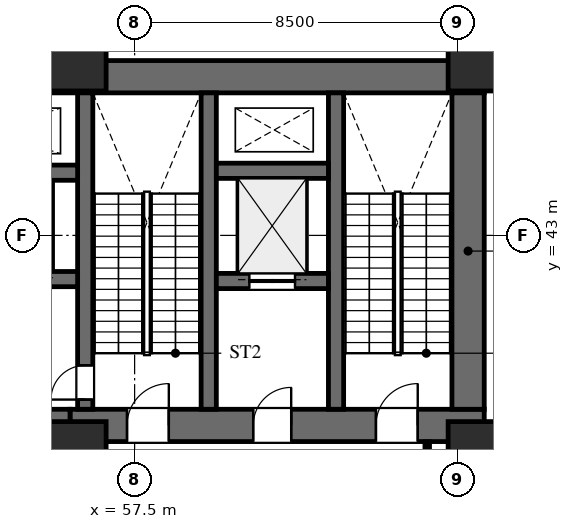
"""IFC4 building model, lengths in metres.
Left out: names, types, materials, properties, quantities, classifications, styles, units other than length and angle.
Written with IfcOpenShell. Run it as: python <this file> out.ifc"""

import sys

from ifc_helpers import new_model, si_unit, direction, frame, frame_2d, origin, origin_2d, place, context, subcontext, project, spatial, rectangle, extrude, element, fill, save


model = new_model("IFC4")
c1 = context("Model", 3, precision=1e-05, world=origin(), true_north=direction((0.0, 1.0)))
c2 = subcontext(c1, "Body", "Model", "MODEL_VIEW")
j1 = project(units=[si_unit("LENGTHUNIT", "METRE"), si_unit("PLANEANGLEUNIT", "RADIAN")], contexts=[c1])
p1 = place(None, origin())
s1 = spatial("IfcSite", under=j1, at=p1, CompositionType="ELEMENT")
p2 = place(p1, origin())
s2 = spatial("IfcBuilding", under=s1, at=p2, CompositionType="ELEMENT")
p3 = place(p2, frame((0.0, 0.0, 5.4)))
s3 = spatial("IfcBuildingStorey", under=s2, at=p3, CompositionType="ELEMENT", Elevation=5.4)
p4 = place(p3, frame((22.9, 47.175, 0.0), z_axis=(0.0, 0.0, 1.0), x_axis=(1.0, 0.0, 0.0)))
e1 = element("IfcWall", 1, at=p4, inside=s3, PredefinedType="SHEAR", context=c2, shape_type="SweptSolid", body=[
    extrude(rectangle(XDim=43.8, YDim=0.85, at=frame_2d((21.9, 0.0))), origin(), (0.0, 0.0, 1.0), 5.4),
])
p5 = place(p3, frame((55.8, 38.0, 0.0), z_axis=(0.0, 0.0, 1.0), x_axis=(1.0, 0.0, 0.0)))
e2 = element("IfcWall", 2, at=p5, inside=s3, PredefinedType="SHEAR", context=c2, shape_type="SweptSolid", body=[
    extrude(rectangle(XDim=10.9, YDim=0.85, at=frame_2d((5.45, 0.0))), origin(), (0.0, 0.0, 1.0), 5.4),
])
p6 = place(p5, frame((1.5, 0.0, 0.0)))
e3 = element("IfcOpeningElement", 3, at=p6, cuts=e2, PredefinedType="OPENING", context=c2, shape_type="SweptSolid", body=[
    extrude(rectangle(XDim=1.1, YDim=2.2, at=frame_2d((0.55, 1.1))), frame((0.0, 0.435, 0.0), z_axis=(0.0, -1.0, 0.0), x_axis=(1.0, 0.0, 0.0)), (0.0, 0.0, 1.0), 0.87),
])
p7 = place(p5, frame((4.82, 0.0, 0.0)))
e4 = element("IfcOpeningElement", 4, at=p7, cuts=e2, PredefinedType="OPENING", context=c2, shape_type="SweptSolid", body=[
    extrude(rectangle(XDim=1.0, YDim=2.15, at=frame_2d((0.5, 1.075))), frame((0.0, 0.435, 0.0), z_axis=(0.0, -1.0, 0.0), x_axis=(1.0, 0.0, 0.0)), (0.0, 0.0, 1.0), 0.87),
])
p8 = place(p5, frame((8.05, 0.0, 0.0)))
e5 = element("IfcOpeningElement", 5, at=p8, cuts=e2, PredefinedType="OPENING", context=c2, shape_type="SweptSolid", body=[
    extrude(rectangle(XDim=1.1, YDim=2.2, at=frame_2d((0.55, 1.1))), frame((0.0, 0.435, 0.0), z_axis=(0.0, -1.0, 0.0), x_axis=(1.0, 0.0, 0.0)), (0.0, 0.0, 1.0), 0.87),
])
p9 = place(p3, frame((66.275, 38.425, 0.0), z_axis=(0.0, 0.0, 1.0), x_axis=(0.0, 1.0, 0.0)))
e6 = element("IfcWall", 6, at=p9, inside=s3, PredefinedType="SHEAR", context=c2, shape_type="SweptSolid", body=[
    extrude(rectangle(XDim=8.325, YDim=0.85, at=frame_2d((4.163, 0.0))), origin(), (0.0, 0.0, 1.0), 5.4),
])
for number, where, z_axis, x_axis in (
    (7, (62.8, 38.425, 0.0), (0.0, 0.0, 1.0), (0.0, 1.0, 0.0)),
    (8, (59.45, 38.425, 0.0), (0.0, 0.0, 1.0), (0.0, 1.0, 0.0)),
):
    element("IfcWall", number, at=place(p3, frame(where, z_axis=z_axis, x_axis=x_axis)), inside=s3, PredefinedType="SHEAR", context=c2, shape_type="SweptSolid", body=[
        extrude(rectangle(XDim=8.325, YDim=0.4, at=frame_2d((4.163, 0.0))), origin(), (0.0, 0.0, 1.0), 5.4),
    ])
p10 = place(p3, frame((56.2, 38.425, 0.0), z_axis=(0.0, 0.0, 1.0), x_axis=(0.0, 1.0, 0.0)))
e9 = element("IfcWall", 9, at=p10, inside=s3, PredefinedType="SHEAR", context=c2, shape_type="SweptSolid", body=[
    extrude(rectangle(XDim=8.325, YDim=0.4, at=frame_2d((4.163, 0.0))), origin(), (0.0, 0.0, 1.0), 5.4),
])
p11 = place(p10, frame((0.255, 0.0, 0.0)))
e10 = element("IfcOpeningElement", 10, at=p11, cuts=e9, PredefinedType="OPENING", context=c2, shape_type="SweptSolid", body=[
    extrude(rectangle(XDim=0.9, YDim=2.15, at=frame_2d((0.45, 1.075))), frame((0.0, 0.21, 0.0), z_axis=(0.0, -1.0, 0.0), x_axis=(1.0, 0.0, 0.0)), (0.0, 0.0, 1.0), 0.42),
])
p12 = place(p3, frame((59.65, 41.8, 0.0), z_axis=(0.0, 0.0, 1.0), x_axis=(1.0, 0.0, 0.0)))
e11 = element("IfcWall", 11, at=p12, inside=s3, PredefinedType="SHEAR", context=c2, shape_type="SweptSolid", body=[
    extrude(rectangle(XDim=2.95, YDim=0.4, at=frame_2d((1.475, 0.0))), origin(), (0.0, 0.0, 1.0), 5.4),
])
p13 = place(p12, frame((0.87, 0.0, 0.0)))
e12 = element("IfcOpeningElement", 12, at=p13, cuts=e11, PredefinedType="OPENING", context=c2, shape_type="SweptSolid", body=[
    extrude(rectangle(XDim=1.2, YDim=2.2, at=frame_2d((0.6, 1.1))), frame((0.0, 0.21, 0.0), z_axis=(0.0, -1.0, 0.0), x_axis=(1.0, 0.0, 0.0)), (0.0, 0.0, 1.0), 0.42),
])
p14 = place(p3, frame((59.65, 44.7, 0.0), z_axis=(0.0, 0.0, 1.0), x_axis=(1.0, 0.0, 0.0)))
e13 = element("IfcWall", 13, at=p14, inside=s3, PredefinedType="SHEAR", context=c2, shape_type="SweptSolid", body=[
    extrude(rectangle(XDim=2.95, YDim=0.4, at=frame_2d((1.475, 0.0))), origin(), (0.0, 0.0, 1.0), 5.4),
])
p15 = place(p3, frame((50.8, 38.0, 0.0), z_axis=(0.0, 0.0, 1.0), x_axis=(1.0, 0.0, 0.0)))
e14 = element("IfcWall", 14, at=p15, inside=s3, PredefinedType="SHEAR", context=c2, shape_type="SweptSolid", body=[
    extrude(rectangle(XDim=5.0, YDim=0.85, at=frame_2d((2.5, 0.0))), origin(), (0.0, 0.0, 1.0), 5.4),
])
p16 = place(p15, frame((2.0, 0.0, 0.0)))
e15 = element("IfcOpeningElement", 15, at=p16, cuts=e14, PredefinedType="OPENING", context=c2, shape_type="SweptSolid", body=[
    extrude(rectangle(XDim=1.2, YDim=2.2, at=frame_2d((0.6, 1.1))), frame((0.0, 0.435, 0.0), z_axis=(0.0, -1.0, 0.0), x_axis=(1.0, 0.0, 0.0)), (0.0, 0.0, 1.0), 0.87),
])
p17 = place(p3, frame((51.25, 41.85, 0.0), z_axis=(0.0, 0.0, 1.0), x_axis=(1.0, 0.0, 0.0)))
e16 = element("IfcWall", 16, at=p17, inside=s3, PredefinedType="SHEAR", context=c2, shape_type="SweptSolid", body=[
    extrude(rectangle(XDim=4.75, YDim=0.4, at=frame_2d((2.375, 0.0))), origin(), (0.0, 0.0, 1.0), 5.4),
])
p18 = place(p17, frame((0.5, 0.0, 0.0)))
e17 = element("IfcOpeningElement", 17, at=p18, cuts=e16, PredefinedType="OPENING", context=c2, shape_type="SweptSolid", body=[
    extrude(rectangle(XDim=1.2, YDim=2.2, at=frame_2d((0.6, 1.1))), frame((0.0, 0.21, 0.0), z_axis=(0.0, -1.0, 0.0), x_axis=(1.0, 0.0, 0.0)), (0.0, 0.0, 1.0), 0.42),
])
p19 = place(p17, frame((2.6, 0.0, 0.0)))
e18 = element("IfcOpeningElement", 18, at=p19, cuts=e16, PredefinedType="OPENING", context=c2, shape_type="SweptSolid", body=[
    extrude(rectangle(XDim=1.2, YDim=2.2, at=frame_2d((0.6, 1.1))), frame((0.0, 0.21, 0.0), z_axis=(0.0, -1.0, 0.0), x_axis=(1.0, 0.0, 0.0)), (0.0, 0.0, 1.0), 0.42),
])
p20 = place(p3, frame((51.25, 44.65, 0.0), z_axis=(0.0, 0.0, 1.0), x_axis=(1.0, 0.0, 0.0)))
e19 = element("IfcWall", 19, at=p20, inside=s3, PredefinedType="SHEAR", context=c2, shape_type="SweptSolid", body=[
    extrude(rectangle(XDim=4.75, YDim=0.4, at=frame_2d((2.375, 0.0))), origin(), (0.0, 0.0, 1.0), 5.4),
])
for number, where, z_axis, x_axis in (
    (20, (66.5, 47.55, 0.0), (0.0, 0.0, 1.0), (1.0, 0.0, 0.0)),
    (21, (56.0, 47.55, 0.0), (0.0, 0.0, 1.0), (1.0, 0.0, 0.0)),
    (22, (66.5, 37.35, 0.0), (0.0, 0.0, 1.0), (1.0, 0.0, 0.0)),
    (23, (56.0, 37.35, 0.0), (0.0, 0.0, 1.0), (1.0, 0.0, 0.0)),
):
    element("IfcColumn", number, at=place(p3, frame(where, z_axis=z_axis, x_axis=x_axis)), inside=s3, PredefinedType="COLUMN", context=c2, shape_type="SweptSolid", body=[
        extrude(rectangle(XDim=1.5, YDim=1.5, at=origin_2d()), origin(), (0.0, 0.0, 1.0), 5.4),
    ])
p21 = place(p3, frame((65.2, 34.4, 0.0), z_axis=(0.0, 0.0, 1.0), x_axis=(0.0, 1.0, 0.0)))
e24 = element("IfcWall", 24, at=p21, inside=s3, PredefinedType="PARTITIONING", context=c2, shape_type="SweptSolid", body=[
    extrude(rectangle(XDim=3.167, YDim=0.12, at=frame_2d((1.583, 0.0))), origin(), (0.0, 0.0, 1.0), 4.182),
])
p22 = place(p6, origin())
e25 = element("IfcDoor", 25, at=p22, inside=s3, OperationType="SINGLE_SWING_RIGHT", PredefinedType="DOOR", context=c2, shape_type="SweptSolid", body=[
    extrude(rectangle(XDim=1.1, YDim=2.2, at=frame_2d((0.55, 1.1))), frame((0.0, 0.025, 0.0), z_axis=(0.0, -1.0, 0.0), x_axis=(1.0, 0.0, 0.0)), (0.0, 0.0, 1.0), 0.05),
])
fill(e3, e25)
p23 = place(p7, origin())
e26 = element("IfcDoor", 26, at=p23, inside=s3, OperationType="SINGLE_SWING_RIGHT", PredefinedType="DOOR", context=c2, shape_type="SweptSolid", body=[
    extrude(rectangle(XDim=1.0, YDim=2.15, at=frame_2d((0.5, 1.075))), frame((0.0, 0.025, 0.0), z_axis=(0.0, -1.0, 0.0), x_axis=(1.0, 0.0, 0.0)), (0.0, 0.0, 1.0), 0.05),
])
fill(e4, e26)
p24 = place(p8, origin())
e27 = element("IfcDoor", 27, at=p24, inside=s3, OperationType="SINGLE_SWING_RIGHT", PredefinedType="DOOR", context=c2, shape_type="SweptSolid", body=[
    extrude(rectangle(XDim=1.1, YDim=2.2, at=frame_2d((0.55, 1.1))), frame((0.0, 0.025, 0.0), z_axis=(0.0, -1.0, 0.0), x_axis=(1.0, 0.0, 0.0)), (0.0, 0.0, 1.0), 0.05),
])
fill(e5, e27)
p25 = place(p11, origin())
e28 = element("IfcDoor", 28, at=p25, inside=s3, OperationType="SINGLE_SWING_LEFT", PredefinedType="DOOR", context=c2, shape_type="SweptSolid", body=[
    extrude(rectangle(XDim=0.9, YDim=2.15, at=frame_2d((0.45, 1.075))), frame((0.0, 0.025, 0.0), z_axis=(0.0, -1.0, 0.0), x_axis=(1.0, 0.0, 0.0)), (0.0, 0.0, 1.0), 0.05),
])
fill(e10, e28)
p26 = place(p13, origin())
e29 = element("IfcDoor", 29, at=p26, inside=s3, OperationType="DOUBLE_DOOR_SLIDING", PredefinedType="DOOR", context=c2, shape_type="SweptSolid", body=[
    extrude(rectangle(XDim=1.2, YDim=2.2, at=frame_2d((0.6, 1.1))), frame((0.0, 0.025, 0.0), z_axis=(0.0, -1.0, 0.0), x_axis=(1.0, 0.0, 0.0)), (0.0, 0.0, 1.0), 0.05),
])
fill(e12, e29)
save(model, sys.argv[1])
